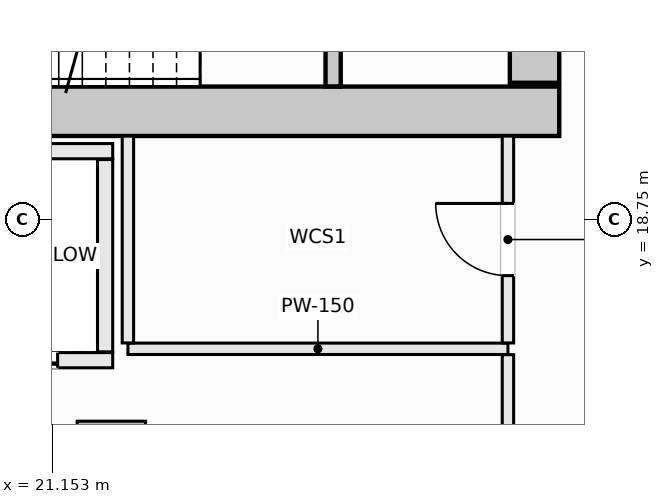
"""IFC4 building model, lengths in metres.
Left out: names, types, materials, properties, quantities, classifications, styles, units other than length and angle.
Written with IfcOpenShell. Run it as: python <this file> out.ifc"""

import sys

from ifc_helpers import new_model, si_unit, direction, frame, frame_2d, origin, origin_2d, place, context, subcontext, project, spatial, rectangle, extrude, element, fill, save


model = new_model("IFC4")
c1 = context("Model", 3, precision=1e-05, world=origin(), true_north=direction((0.0, 1.0)))
c2 = subcontext(c1, "Body", "Model", "MODEL_VIEW")
j1 = project(units=[si_unit("LENGTHUNIT", "METRE"), si_unit("PLANEANGLEUNIT", "RADIAN")], contexts=[c1])
p1 = place(None, origin())
s1 = spatial("IfcSite", under=j1, at=p1, CompositionType="ELEMENT")
p2 = place(p1, origin())
s2 = spatial("IfcBuilding", under=s1, at=p2, CompositionType="ELEMENT")
p3 = place(p2, frame((0.0, 0.0, 100.8)))
s3 = spatial("IfcBuildingStorey", under=s2, at=p3, CompositionType="ELEMENT", Elevation=100.8)
p4 = place(p3, frame((14.175, 20.175, -0.28), z_axis=(0.0, 0.0, 1.0), x_axis=(1.0, 0.0, 0.0)))
e1 = element("IfcWall", 1, at=p4, inside=s3, PredefinedType="SHEAR", context=c2, shape_type="SweptSolid", body=[
    extrude(rectangle(XDim=13.65, YDim=0.65, at=frame_2d((6.825, 0.0))), origin(), (0.0, 0.0, 1.0), 4.51),
])
p5 = place(p3, frame((27.5, 20.55, -0.28), z_axis=(0.0, 0.0, 1.0), x_axis=(0.0, 1.0, 0.0)))
e2 = element("IfcWall", 2, at=p5, inside=s3, PredefinedType="SHEAR", context=c2, shape_type="SweptSolid", body=[
    extrude(rectangle(XDim=1.5, YDim=0.65, at=frame_2d((0.75, 0.0))), origin(), (0.0, 0.0, 1.0), 4.51),
])
p6 = place(p3, frame((21.932, 15.648, -0.28), z_axis=(0.0, 0.0, 1.0), x_axis=(1.0, 0.0, 0.0)))
e3 = element("IfcColumn", 3, at=p6, inside=s3, PredefinedType="COLUMN", context=c2, shape_type="SweptSolid", body=[
    extrude(rectangle(XDim=0.9, YDim=0.9, at=origin_2d()), origin(), (0.0, 0.0, 1.0), 4.51),
])
p7 = place(p3, frame((24.85, 20.502, -0.28), z_axis=(0.0, 0.0, 1.0), x_axis=(0.0, 1.0, 0.0)))
e4 = element("IfcWall", 4, at=p7, inside=s3, PredefinedType="SHEAR", context=c2, shape_type="SweptSolid", body=[
    extrude(rectangle(XDim=3.038, YDim=0.2, at=frame_2d((1.519, 0.0))), origin(), (0.0, 0.0, 1.0), 4.51),
])
p8 = place(p7, frame((0.969, 0.0, 0.28)))
e5 = element("IfcOpeningElement", 5, at=p8, cuts=e4, PredefinedType="OPENING", context=c2, shape_type="SweptSolid", body=[
    extrude(rectangle(XDim=1.1, YDim=2.15, at=frame_2d((0.55, 1.075))), frame((0.0, 0.11, 0.0), z_axis=(0.0, -1.0, 0.0), x_axis=(1.0, 0.0, 0.0)), (0.0, 0.0, 1.0), 0.22),
])
p9 = place(p3, frame((19.4, 19.65, 0.0), z_axis=(0.0, 0.0, 1.0), x_axis=(1.0, 0.0, 0.0)))
e6 = element("IfcWall", 6, at=p9, inside=s3, PredefinedType="SOLIDWALL", context=c2, shape_type="SweptSolid", body=[
    extrude(rectangle(XDim=2.55, YDim=0.2, at=frame_2d((1.275, 0.0))), origin(), (0.0, 0.0, 1.0), 4.23),
])
p10 = place(p3, frame((19.4, 16.9, 0.0), z_axis=(0.0, 0.0, 1.0), x_axis=(1.0, 0.0, 0.0)))
e7 = element("IfcWall", 7, at=p10, inside=s3, PredefinedType="SOLIDWALL", context=c2, shape_type="SweptSolid", body=[
    extrude(rectangle(XDim=2.55, YDim=0.2, at=frame_2d((1.275, 0.0))), origin(), (0.0, 0.0, 1.0), 4.23),
])
p11 = place(p10, frame((0.725, 0.0, 0.0)))
e8 = element("IfcOpeningElement", 8, at=p11, cuts=e7, PredefinedType="OPENING", context=c2, shape_type="SweptSolid", body=[
    extrude(rectangle(XDim=1.1, YDim=2.2, at=frame_2d((0.55, 1.1))), frame((0.0, 0.11, 0.0), z_axis=(0.0, -1.0, 0.0), x_axis=(1.0, 0.0, 0.0)), (0.0, 0.0, 1.0), 0.22),
])
p12 = place(p3, frame((21.85, 17.01, 0.0), z_axis=(0.0, 0.0, 1.0), x_axis=(0.0, 1.0, 0.0)))
e9 = element("IfcWall", 9, at=p12, inside=s3, PredefinedType="SOLIDWALL", context=c2, shape_type="SweptSolid", body=[
    extrude(rectangle(XDim=2.53, YDim=0.2, at=frame_2d((1.265, 0.0))), origin(), (0.0, 0.0, 1.0), 4.23),
])
p13 = place(p3, frame((22.15, 17.05, 0.0), z_axis=(0.0, 0.0, 1.0), x_axis=(1.0, 0.0, 0.0)))
e10 = element("IfcWall", 10, at=p13, inside=s3, PredefinedType="PARTITIONING", context=c2, shape_type="SweptSolid", body=[
    extrude(rectangle(XDim=5.0, YDim=0.15, at=frame_2d((2.5, 0.0))), origin(), (0.0, 0.0, 1.0), 4.23),
])
p14 = place(p3, frame((22.15, 17.127, 0.0), z_axis=(0.0, 0.0, 1.0), x_axis=(0.0, 1.0, 0.0)))
e11 = element("IfcWall", 11, at=p14, inside=s3, PredefinedType="PARTITIONING", context=c2, shape_type="SweptSolid", body=[
    extrude(rectangle(XDim=2.721, YDim=0.15, at=frame_2d((1.36, 0.0))), origin(), (0.0, 0.0, 1.0), 4.23),
])
p15 = place(p3, frame((27.15, 11.75, 0.0), z_axis=(0.0, 0.0, 1.0), x_axis=(0.0, 1.0, 0.0)))
e12 = element("IfcWall", 12, at=p15, inside=s3, PredefinedType="PARTITIONING", context=c2, shape_type="SweptSolid", body=[
    extrude(rectangle(XDim=5.223, YDim=0.15, at=frame_2d((2.611, 0.0))), origin(), (0.0, 0.0, 1.0), 4.23),
])
p16 = place(p15, frame((2.665, 0.0, 0.0)))
e13 = element("IfcOpeningElement", 13, at=p16, cuts=e12, PredefinedType="OPENING", context=c2, shape_type="SweptSolid", body=[
    extrude(rectangle(XDim=0.95, YDim=2.1, at=frame_2d((0.475, 1.05))), frame((0.0, 0.085, 0.0), z_axis=(0.0, -1.0, 0.0), x_axis=(1.0, 0.0, 0.0)), (0.0, 0.0, 1.0), 0.17),
])
p17 = place(p3, frame((27.15, 17.127, 0.0), z_axis=(0.0, 0.0, 1.0), x_axis=(0.0, 1.0, 0.0)))
e14 = element("IfcWall", 14, at=p17, inside=s3, PredefinedType="PARTITIONING", context=c2, shape_type="SweptSolid", body=[
    extrude(rectangle(XDim=2.721, YDim=0.15, at=frame_2d((1.36, 0.0))), origin(), (0.0, 0.0, 1.0), 4.23),
])
p18 = place(p17, frame((0.885, 0.0, 0.0)))
e15 = element("IfcOpeningElement", 15, at=p18, cuts=e14, PredefinedType="OPENING", context=c2, shape_type="SweptSolid", body=[
    extrude(rectangle(XDim=0.95, YDim=2.1, at=frame_2d((0.475, 1.05))), frame((0.0, 0.085, 0.0), z_axis=(0.0, -1.0, 0.0), x_axis=(1.0, 0.0, 0.0)), (0.0, 0.0, 1.0), 0.17),
])
p19 = place(p11, origin())
e16 = element("IfcDoor", 16, at=p19, inside=s3, OperationType="SLIDING_TO_LEFT", PredefinedType="DOOR", context=c2, shape_type="SweptSolid", body=[
    extrude(rectangle(XDim=1.1, YDim=2.2, at=frame_2d((0.55, 1.1))), frame((0.0, 0.025, 0.0), z_axis=(0.0, -1.0, 0.0), x_axis=(1.0, 0.0, 0.0)), (0.0, 0.0, 1.0), 0.05),
])
fill(e8, e16)
p20 = place(p18, origin())
e17 = element("IfcDoor", 17, at=p20, inside=s3, OperationType="SINGLE_SWING_RIGHT", PredefinedType="DOOR", context=c2, shape_type="SweptSolid", body=[
    extrude(rectangle(XDim=0.95, YDim=2.1, at=frame_2d((0.475, 1.05))), frame((0.0, 0.025, 0.0), z_axis=(0.0, -1.0, 0.0), x_axis=(1.0, 0.0, 0.0)), (0.0, 0.0, 1.0), 0.05),
])
fill(e15, e17)
save(model, sys.argv[1])
